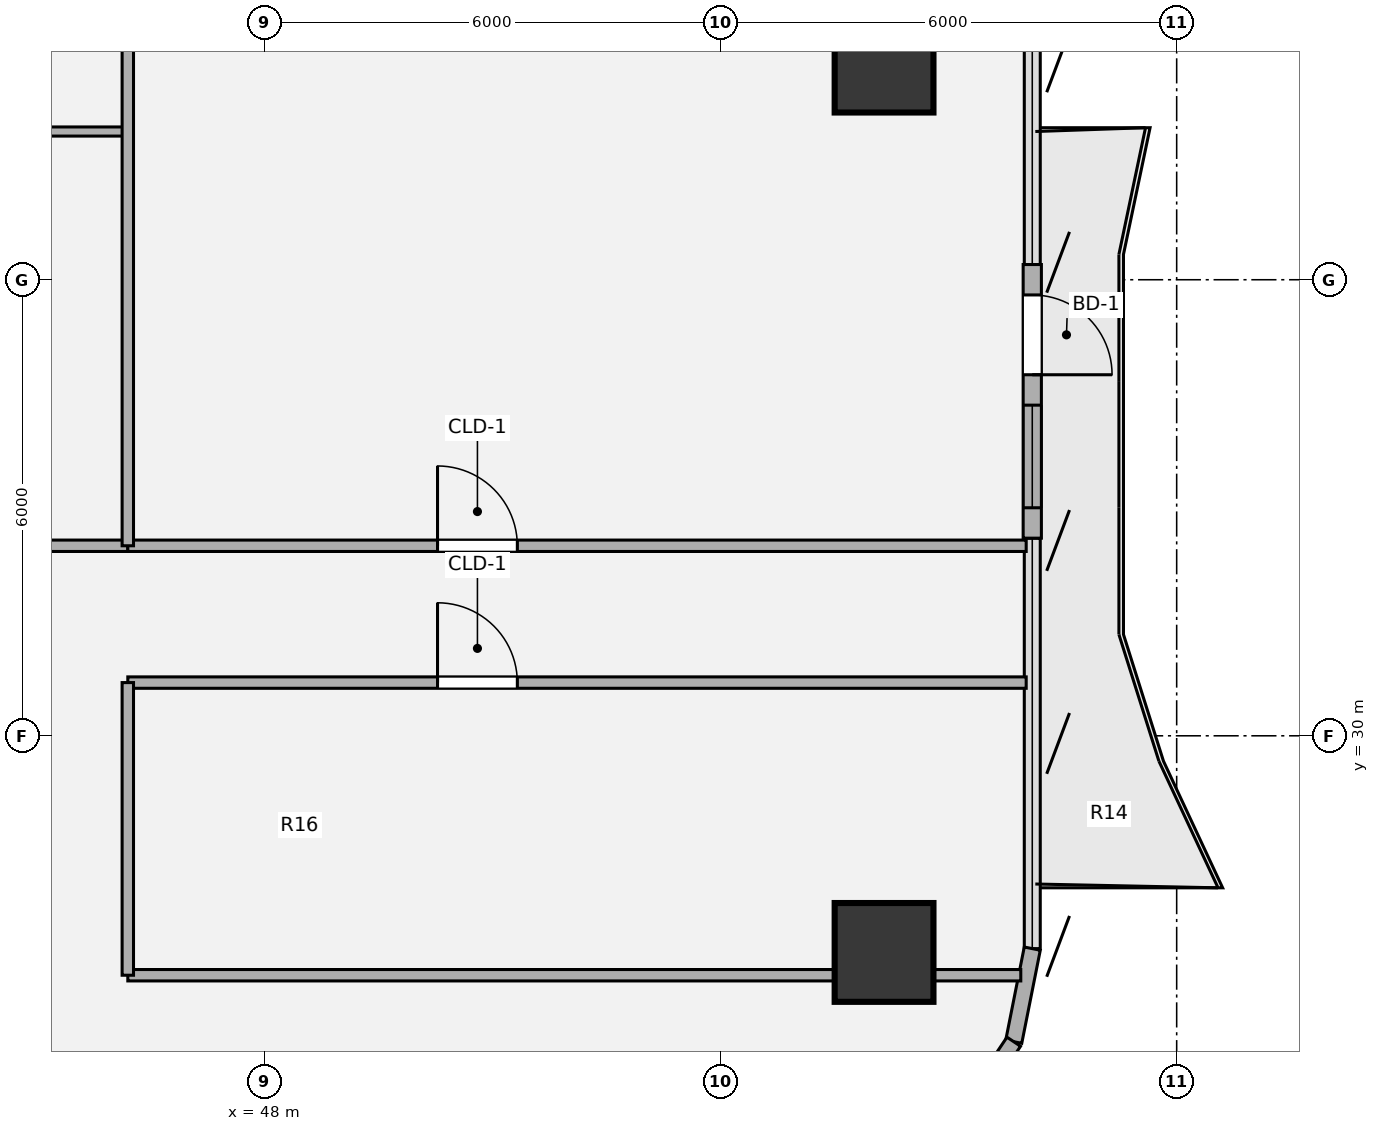
"""IFC4 building model, lengths in metres.
Left out: names, types, materials, properties, quantities, classifications, styles, units other than length and angle.
Written with IfcOpenShell. Run it as: python <this file> out.ifc"""

import sys

from ifc_helpers import new_model, si_unit, direction, frame, frame_2d, origin, origin_2d, place, context, subcontext, project, spatial, rectangle, hollow_circle, extrude, source, transform, mapped, element, fill, save


model = new_model("IFC4")
c1 = context("Model", 3, precision=1e-05, world=origin(), true_north=direction((0.0, 1.0)))
c2 = subcontext(c1, "Body", "Model", "MODEL_VIEW")
j1 = project(units=[si_unit("LENGTHUNIT", "METRE"), si_unit("PLANEANGLEUNIT", "RADIAN")], contexts=[c1])
p1 = place(None, origin())
s1 = spatial("IfcSite", under=j1, at=p1, CompositionType="ELEMENT")
p2 = place(p1, origin())
s2 = spatial("IfcBuilding", under=s1, at=p2, CompositionType="ELEMENT")
p3 = place(p2, frame((0.0, 0.0, 138.96)))
s3 = spatial("IfcBuildingStorey", under=s2, at=p3, CompositionType="ELEMENT", Elevation=138.96)
m1 = source(origin(), c2, "Body", "SweptSolid", [
    extrude(hollow_circle(Radius=0.65, WallThickness=0.045, at=origin_2d()), origin(), (0.0, 0.0, 1.0), 3.78),
])
for number, where, z_axis, x_axis in (
    (1, (56.15, 27.15, 0.0), (0.0, 0.0, 1.0), (1.0, 0.0, 0.0)),
    (2, (56.15, 38.85, 0.0), (0.0, 0.0, 1.0), (1.0, 0.0, 0.0)),
):
    element("IfcColumn", number, at=place(p3, frame(where, z_axis=z_axis, x_axis=x_axis)), inside=s3, PredefinedType="COLUMN", context=c2, shape_type="MappedRepresentation", body=[
        mapped(m1, transform((0.0, 0.0, 0.0), x_axis=(1.0, 0.0, 0.0), y_axis=(0.0, 1.0, 0.0), z_axis=(0.0, 0.0, 1.0), scale=1.0)),
    ])
p4 = place(p3, frame((58.1, 36.2, 0.0), z_axis=(0.0, 0.0, 1.0), x_axis=(0.0, -1.0, 0.0)))
e3 = element("IfcWall", 3, at=p4, inside=s3, PredefinedType="SOLIDWALL", context=c2, shape_type="SweptSolid", body=[
    extrude(rectangle(XDim=3.6, YDim=0.24, at=frame_2d((1.8, 0.0))), origin(), (0.0, 0.0, 1.0), 3.53),
])
p5 = place(p4, frame((0.4, 0.0, 0.0)))
e4 = element("IfcOpeningElement", 4, at=p5, cuts=e3, PredefinedType="OPENING", context=c2, shape_type="SweptSolid", body=[
    extrude(rectangle(XDim=1.05, YDim=2.15, at=origin_2d()), frame((0.525, 0.13, 1.075), z_axis=(0.0, -1.0, 0.0), x_axis=(1.0, 0.0, 0.0)), (0.0, 0.0, 1.0), 0.26),
])
p6 = place(p4, frame((1.85, 0.0, 0.85)))
e5 = element("IfcOpeningElement", 5, at=p6, cuts=e3, PredefinedType="OPENING", context=c2, shape_type="SweptSolid", body=[
    extrude(rectangle(XDim=1.35, YDim=1.35, at=origin_2d()), frame((0.675, 0.13, 0.675), z_axis=(0.0, -1.0, 0.0), x_axis=(1.0, 0.0, 0.0)), (0.0, 0.0, 1.0), 0.26),
])
for number, where, z_axis, x_axis in (
    (6, (58.1, 27.2, 0.0), (0.0, 0.0, 1.0), (-0.195, -0.981, 0.0)),
    (7, (57.856, 25.975, 0.0), (0.0, 0.0, 1.0), (-0.556, -0.831, 0.0)),
):
    element("IfcWall", number, at=place(p3, frame(where, z_axis=z_axis, x_axis=x_axis)), inside=s3, PredefinedType="SOLIDWALL", context=c2, shape_type="SweptSolid", body=[
        extrude(rectangle(XDim=1.249, YDim=0.215, at=frame_2d((0.624, 0.0))), origin(), (0.0, 0.0, 1.0), 3.53),
    ])
p7 = place(p3, frame((46.2, 26.85, 0.0), z_axis=(0.0, 0.0, 1.0), x_axis=(1.0, 0.0, 0.0)))
e8 = element("IfcWall", 8, at=p7, inside=s3, PredefinedType="PARTITIONING", context=c2, shape_type="SweptSolid", body=[
    extrude(rectangle(XDim=11.749, YDim=0.15, at=frame_2d((5.875, 0.0))), origin(), (0.0, 0.0, 1.0), 3.055),
])
p8 = place(p3, frame((46.2, 30.7, 0.0), z_axis=(0.0, 0.0, 1.0), x_axis=(1.0, 0.0, 0.0)))
e9 = element("IfcWall", 9, at=p8, inside=s3, PredefinedType="PARTITIONING", context=c2, shape_type="SweptSolid", body=[
    extrude(rectangle(XDim=11.82, YDim=0.15, at=frame_2d((5.91, 0.0))), origin(), (0.0, 0.0, 1.0), 3.055),
])
p9 = place(p8, frame((4.075, 0.0, 0.0)))
e10 = element("IfcOpeningElement", 10, at=p9, cuts=e9, PredefinedType="OPENING", context=c2, shape_type="SweptSolid", body=[
    extrude(rectangle(XDim=1.05, YDim=2.1, at=origin_2d()), frame((0.525, 0.085, 1.05), z_axis=(0.0, -1.0, 0.0), x_axis=(1.0, 0.0, 0.0)), (0.0, 0.0, 1.0), 0.17),
])
p10 = place(p3, frame((36.9, 32.5, 0.0), z_axis=(0.0, 0.0, 1.0), x_axis=(1.0, 0.0, 0.0)))
e11 = element("IfcWall", 11, at=p10, inside=s3, PredefinedType="PARTITIONING", context=c2, shape_type="SweptSolid", body=[
    extrude(rectangle(XDim=9.3, YDim=0.15, at=frame_2d((4.65, 0.0))), origin(), (0.0, 0.0, 1.0), 2.982),
])
p11 = place(p3, frame((46.2, 32.5, 0.0), z_axis=(0.0, 0.0, 1.0), x_axis=(1.0, 0.0, 0.0)))
e12 = element("IfcWall", 12, at=p11, inside=s3, PredefinedType="PARTITIONING", context=c2, shape_type="SweptSolid", body=[
    extrude(rectangle(XDim=11.82, YDim=0.15, at=frame_2d((5.91, 0.0))), origin(), (0.0, 0.0, 1.0), 2.982),
])
p12 = place(p11, frame((4.075, 0.0, 0.0)))
e13 = element("IfcOpeningElement", 13, at=p12, cuts=e12, PredefinedType="OPENING", context=c2, shape_type="SweptSolid", body=[
    extrude(rectangle(XDim=1.05, YDim=2.1, at=origin_2d()), frame((0.525, 0.085, 1.05), z_axis=(0.0, -1.0, 0.0), x_axis=(1.0, 0.0, 0.0)), (0.0, 0.0, 1.0), 0.17),
])
p13 = place(p3, frame((42.55, 37.95, 0.0), z_axis=(0.0, 0.0, 1.0), x_axis=(1.0, 0.0, 0.0)))
e14 = element("IfcWall", 14, at=p13, inside=s3, PredefinedType="PARTITIONING", context=c2, shape_type="SweptSolid", body=[
    extrude(rectangle(XDim=3.65, YDim=0.12, at=frame_2d((1.825, 0.0))), origin(), (0.0, 0.0, 1.0), 2.982),
])
p14 = place(p3, frame((46.2, 26.85, 0.0), z_axis=(0.0, 0.0, 1.0), x_axis=(0.0, 1.0, 0.0)))
e15 = element("IfcWall", 15, at=p14, inside=s3, PredefinedType="PARTITIONING", context=c2, shape_type="SweptSolid", body=[
    extrude(rectangle(XDim=3.85, YDim=0.15, at=frame_2d((1.925, 0.0))), origin(), (0.0, 0.0, 1.0), 3.5),
])
p15 = place(p3, frame((46.2, 32.5, 0.0), z_axis=(0.0, 0.0, 1.0), x_axis=(0.0, 1.0, 0.0)))
e16 = element("IfcWall", 16, at=p15, inside=s3, PredefinedType="PARTITIONING", context=c2, shape_type="SweptSolid", body=[
    extrude(rectangle(XDim=14.821, YDim=0.15, at=frame_2d((7.411, 0.0))), origin(), (0.0, 0.0, 1.0), 3.5),
])
m2 = source(origin(), c2, "Body", "SweptSolid", [
    extrude(rectangle(XDim=1.05, YDim=2.15, at=origin_2d()), frame((0.525, 0.025, 1.075), z_axis=(0.0, -1.0, 0.0), x_axis=(1.0, 0.0, 0.0)), (0.0, 0.0, 1.0), 0.05),
])
p16 = place(p5, origin())
e17 = element("IfcDoor", 17, at=p16, inside=s3, OperationType="SINGLE_SWING_RIGHT", PredefinedType="DOOR", context=c2, shape_type="MappedRepresentation", body=[
    mapped(m2, transform((0.0, 0.0, 0.0), x_axis=(1.0, 0.0, 0.0), y_axis=(0.0, 1.0, 0.0), z_axis=(0.0, 0.0, 1.0), scale=1.0)),
])
fill(e4, e17)
m3 = source(origin(), c2, "Body", "SweptSolid", [
    extrude(rectangle(XDim=1.35, YDim=1.35, at=origin_2d()), frame((0.675, 0.03, 0.675), z_axis=(0.0, -1.0, 0.0), x_axis=(1.0, 0.0, 0.0)), (0.0, 0.0, 1.0), 0.06),
])
p17 = place(p6, origin())
e18 = element("IfcWindow", 18, at=p17, inside=s3, PartitioningType="SINGLE_PANEL", PredefinedType="WINDOW", context=c2, shape_type="MappedRepresentation", body=[
    mapped(m3, transform((0.0, 0.0, 0.0), x_axis=(1.0, 0.0, 0.0), y_axis=(0.0, 1.0, 0.0), z_axis=(0.0, 0.0, 1.0), scale=1.0)),
])
fill(e5, e18)
m4 = source(origin(), c2, "Body", "SweptSolid", [
    extrude(rectangle(XDim=1.05, YDim=2.1, at=origin_2d()), frame((0.525, 0.025, 1.05), z_axis=(0.0, -1.0, 0.0), x_axis=(1.0, 0.0, 0.0)), (0.0, 0.0, 1.0), 0.05),
])
p18 = place(p9, origin())
e19 = element("IfcDoor", 19, at=p18, inside=s3, OperationType="SINGLE_SWING_LEFT", PredefinedType="DOOR", context=c2, shape_type="MappedRepresentation", body=[
    mapped(m4, transform((0.0, 0.0, 0.0), x_axis=(1.0, 0.0, 0.0), y_axis=(0.0, 1.0, 0.0), z_axis=(0.0, 0.0, 1.0), scale=1.0)),
])
fill(e10, e19)
p19 = place(p12, origin())
e20 = element("IfcDoor", 20, at=p19, inside=s3, OperationType="SINGLE_SWING_LEFT", PredefinedType="DOOR", context=c2, shape_type="MappedRepresentation", body=[
    mapped(m4, transform((0.0, 0.0, 0.0), x_axis=(1.0, 0.0, 0.0), y_axis=(0.0, 1.0, 0.0), z_axis=(0.0, 0.0, 1.0), scale=1.0)),
])
fill(e13, e20)
save(model, sys.argv[1])
